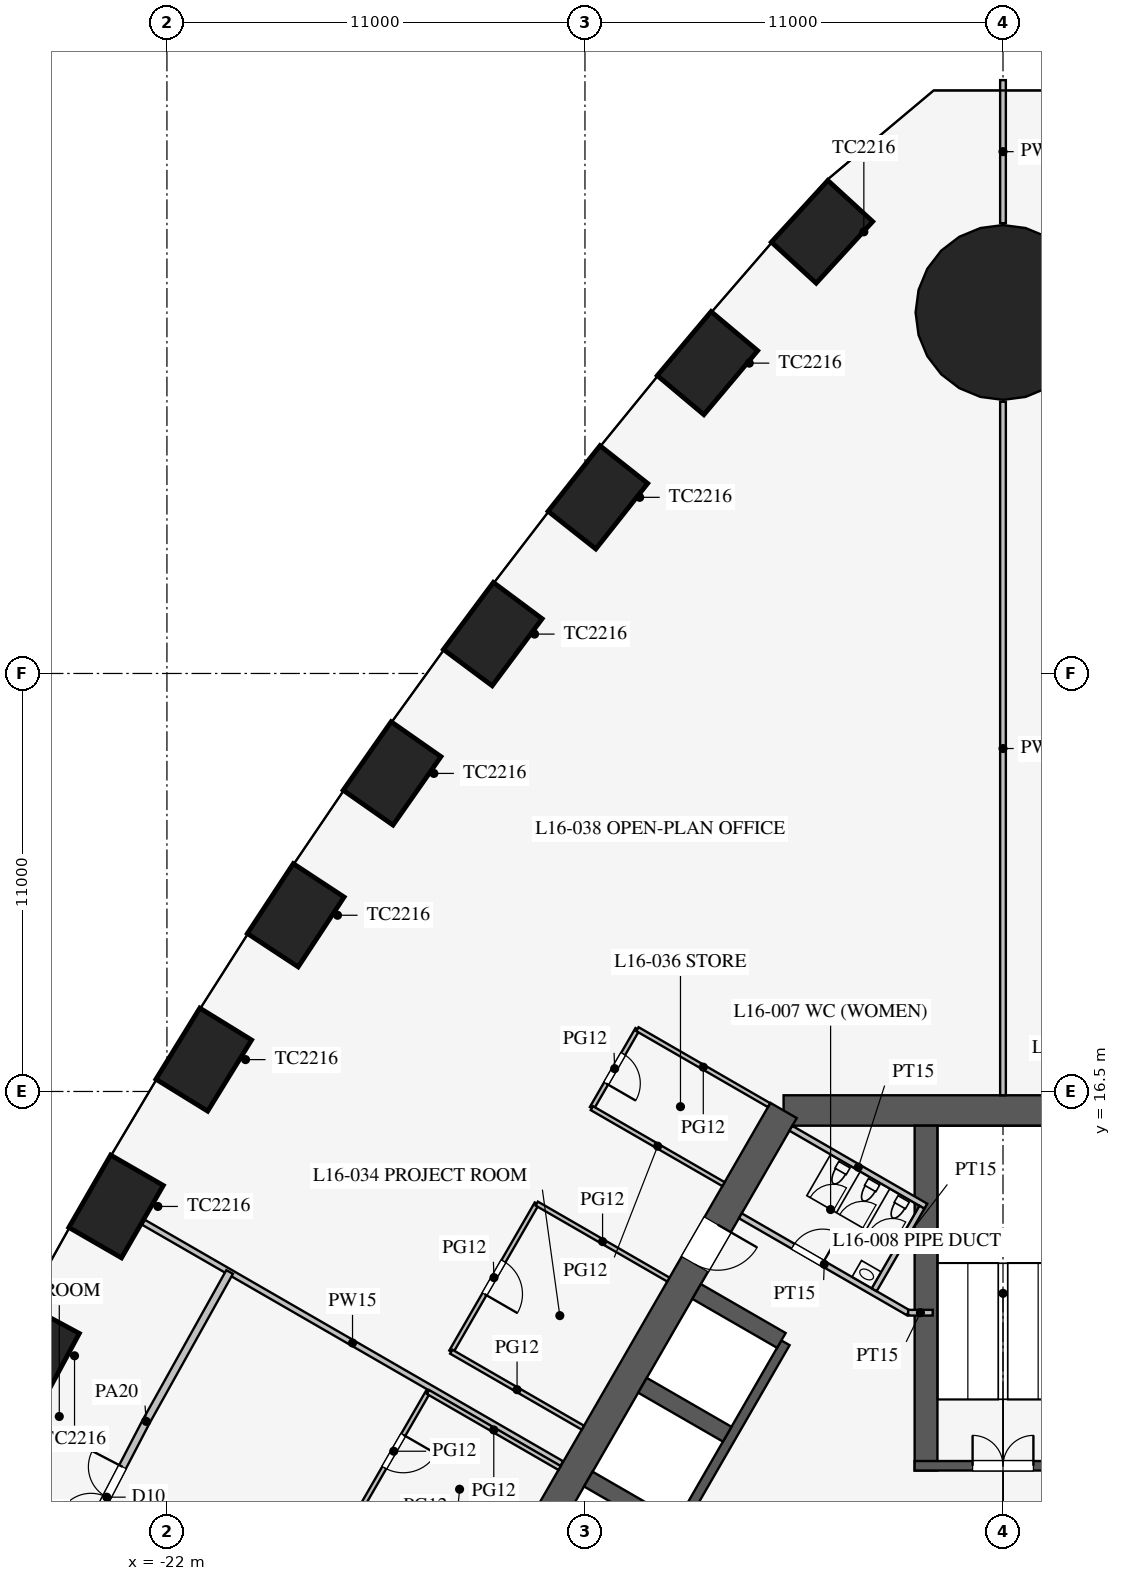
"""IFC4 building model, lengths in metres.
Left out: names, types, materials, properties, quantities, classifications, styles, units other than length and angle.
Written with IfcOpenShell. Run it as: python <this file> out.ifc"""

import sys

from ifc_helpers import new_model, si_unit, direction, frame, frame_2d, origin, origin_2d, place, context, subcontext, project, spatial, rectangle, circle, extrude, element, fill, save


model = new_model("IFC4")
c1 = context("Model", 3, precision=1e-05, world=origin(), true_north=direction((0.0, 1.0)))
c2 = subcontext(c1, "Body", "Model", "MODEL_VIEW")
j1 = project(units=[si_unit("LENGTHUNIT", "METRE"), si_unit("PLANEANGLEUNIT", "RADIAN")], contexts=[c1])
p1 = place(None, origin())
s1 = spatial("IfcSite", under=j1, at=p1, CompositionType="ELEMENT")
p2 = place(p1, origin())
s2 = spatial("IfcBuilding", under=s1, at=p2, CompositionType="ELEMENT")
p3 = place(p2, frame((0.0, 0.0, 71.1)))
s3 = spatial("IfcBuildingStorey", under=s2, at=p3, CompositionType="ELEMENT", Elevation=71.1)
for number, where, z_axis, x_axis in (
    (1, (-4.762, 39.122, 0.0), (0.0, 0.0, 1.0), (-0.676, -0.737, 0.0)),
    (2, (-7.776, 35.667, 0.0), (0.0, 0.0, 1.0), (-0.643, -0.766, 0.0)),
    (3, (-10.66, 32.135, 0.0), (0.0, 0.0, 1.0), (-0.62, -0.784, 0.0)),
    (4, (-13.426, 28.536, 0.0), (0.0, 0.0, 1.0), (-0.597, -0.802, 0.0)),
    (5, (-16.076, 24.87, 0.0), (0.0, 0.0, 1.0), (-0.574, -0.819, 0.0)),
    (6, (-18.611, 21.137, 0.0), (0.0, 0.0, 1.0), (-0.549, -0.836, 0.0)),
    (7, (-21.031, 17.339, 0.0), (0.0, 0.0, 1.0), (-0.525, -0.851, 0.0)),
    (8, (-23.338, 13.474, 0.0), (0.0, 0.0, 1.0), (-0.5, -0.866, 0.0)),
    (9, (-25.531, 9.544, 0.0), (0.0, 0.0, 1.0), (-0.475, -0.88, 0.0)),
):
    element("IfcColumn", number, at=place(p3, frame(where, z_axis=z_axis, x_axis=x_axis)), inside=s3, PredefinedType="COLUMN", context=c2, shape_type="SweptSolid", body=[
        extrude(rectangle(XDim=2.2, YDim=1.6, at=origin_2d()), origin(), (0.0, 0.0, 1.0), 4.2),
    ])
p4 = place(p3, frame((0.0, 37.0, 0.0), z_axis=(0.0, 0.0, 1.0), x_axis=(1.0, 0.0, 0.0)))
e10 = element("IfcColumn", 10, at=p4, inside=s3, PredefinedType="COLUMN", context=c2, shape_type="SweptSolid", body=[
    extrude(circle(Radius=2.3, at=origin_2d()), origin(), (0.0, 0.0, 1.0), 4.2),
])
p5 = place(p3, frame((5.773, 16.0, 0.0), z_axis=(0.0, 0.0, 1.0), x_axis=(-1.0, 0.0, 0.0)))
e11 = element("IfcWall", 11, at=p5, inside=s3, PredefinedType="SHEAR", context=c2, shape_type="SweptSolid", body=[
    extrude(rectangle(XDim=11.547, YDim=0.8, at=frame_2d((5.773, 0.0))), origin(), (0.0, 0.0, 1.0), 4.2),
])
p6 = place(p3, frame((-5.773, 16.0, 0.0), z_axis=(0.0, 0.0, 1.0), x_axis=(-0.500002442456, -0.866023993627, 0.0)))
e12 = element("IfcWall", 12, at=p6, inside=s3, PredefinedType="SHEAR", context=c2, shape_type="SweptSolid", body=[
    extrude(rectangle(XDim=21.939, YDim=0.8, at=frame_2d((10.97, 0.0))), origin(), (0.0, 0.0, 1.0), 4.2),
])
p7 = place(p6, frame((17.27, 0.0, 0.0)))
e13 = element("IfcOpeningElement", 13, at=p7, cuts=e12, PredefinedType="OPENING", context=c2, shape_type="SweptSolid", body=[
    extrude(rectangle(XDim=1.2, YDim=2.1, at=frame_2d((0.6, 1.05))), frame((0.0, 0.41, 0.0), z_axis=(0.0, -1.0, 0.0), x_axis=(1.0, 0.0, 0.0)), (0.0, 0.0, 1.0), 0.82),
])
p8 = place(p6, frame((3.47, 0.0, 0.0)))
e14 = element("IfcOpeningElement", 14, at=p8, cuts=e12, PredefinedType="OPENING", context=c2, shape_type="SweptSolid", body=[
    extrude(rectangle(XDim=1.2, YDim=2.1, at=frame_2d((0.6, 1.05))), frame((0.0, 0.41, 0.0), z_axis=(0.0, -1.0, 0.0), x_axis=(1.0, 0.0, 0.0)), (0.0, 0.0, 1.0), 0.82),
])
p9 = place(p3, frame((-5.724, 9.886, 0.0), z_axis=(0.0, 0.0, 1.0), x_axis=(-0.500001763848, -0.866024385424, 0.0)))
e15 = element("IfcWall", 15, at=p9, inside=s3, PredefinedType="SHEAR", context=c2, shape_type="SweptSolid", body=[
    extrude(rectangle(XDim=11.4, YDim=0.25, at=frame_2d((5.7, 0.0))), origin(), (0.0, 0.0, 1.0), 4.2),
])
p10 = place(p9, frame((6.525, 0.0, 0.0)))
e16 = element("IfcOpeningElement", 16, at=p10, cuts=e15, PredefinedType="OPENING", context=c2, shape_type="SweptSolid", body=[
    extrude(rectangle(XDim=1.2, YDim=2.2, at=frame_2d((0.6, 1.1))), frame((0.0, 0.135, 0.0), z_axis=(0.0, -1.0, 0.0), x_axis=(1.0, 0.0, 0.0)), (0.0, 0.0, 1.0), 0.27),
])
p11 = place(p9, frame((9.375, 0.0, 0.0)))
e17 = element("IfcOpeningElement", 17, at=p11, cuts=e15, PredefinedType="OPENING", context=c2, shape_type="SweptSolid", body=[
    extrude(rectangle(XDim=1.2, YDim=2.2, at=frame_2d((0.6, 1.1))), frame((0.0, 0.135, 0.0), z_axis=(0.0, -1.0, 0.0), x_axis=(1.0, 0.0, 0.0)), (0.0, 0.0, 1.0), 0.27),
])
p12 = place(p3, frame((-5.832, 9.949, 0.0), z_axis=(0.0, 0.0, 1.0), x_axis=(-0.866029291668, 0.499993265928, 0.0)))
e18 = element("IfcWall", 18, at=p12, inside=s3, PredefinedType="SHEAR", context=c2, shape_type="SweptSolid", body=[
    extrude(rectangle(XDim=2.575, YDim=0.45, at=frame_2d((1.288, 0.0))), origin(), (0.0, 0.0, 1.0), 4.2),
])
for number, where, z_axis, x_axis in (
    (19, (-7.257, 7.481, 0.0), (0.0, 0.0, 1.0), (-0.866, 0.5, 0.0)),
    (20, (-8.682, 5.012, 0.0), (0.0, 0.0, 1.0), (-0.866, 0.5, 0.0)),
):
    element("IfcWall", number, at=place(p3, frame(where, z_axis=z_axis, x_axis=x_axis)), inside=s3, PredefinedType="SHEAR", context=c2, shape_type="SweptSolid", body=[
        extrude(rectangle(XDim=2.575, YDim=0.45, at=frame_2d((1.288, 0.0))), origin(), (0.0, 0.0, 1.0), 4.2),
    ])
p13 = place(p3, frame((-2.025, 6.525, 0.0), z_axis=(0.0, 0.0, 1.0), x_axis=(0.0, 1.0, 0.0)))
e21 = element("IfcWall", 21, at=p13, inside=s3, PredefinedType="SHEAR", context=c2, shape_type="SweptSolid", body=[
    extrude(rectangle(XDim=9.075, YDim=0.6, at=frame_2d((4.538, 0.0))), origin(), (0.0, 0.0, 1.0), 4.2),
])
p14 = place(p3, frame((2.325, 6.65, 0.0), z_axis=(0.0, 0.0, 1.0), x_axis=(-1.0, 0.0, 0.0)))
e22 = element("IfcWall", 22, at=p14, inside=s3, PredefinedType="SHEAR", context=c2, shape_type="SweptSolid", body=[
    extrude(rectangle(XDim=4.65, YDim=0.25, at=frame_2d((2.325, 0.0))), origin(), (0.0, 0.0, 1.0), 4.2),
])
p15 = place(p14, frame((1.525, 0.0, 0.0)))
e23 = element("IfcOpeningElement", 23, at=p15, cuts=e22, PredefinedType="OPENING", context=c2, shape_type="SweptSolid", body=[
    extrude(rectangle(XDim=1.6, YDim=2.1, at=frame_2d((0.8, 1.05))), frame((0.0, 0.135, 0.0), z_axis=(0.0, -1.0, 0.0), x_axis=(1.0, 0.0, 0.0)), (0.0, 0.0, 1.0), 0.27),
])
p16 = place(p3, frame((-2.495, 10.678, 0.0), z_axis=(0.0, 0.0, 1.0), x_axis=(-0.86602216432, 0.500005610874, 0.0)))
e24 = element("IfcWall", 24, at=p16, inside=s3, PredefinedType="PARTITIONING", context=c2, shape_type="SweptSolid", body=[
    extrude(rectangle(XDim=5.1, YDim=0.15, at=frame_2d((2.55, 0.0))), origin(), (0.0, 0.0, 1.0), 4.0),
])
p17 = place(p16, frame((2.6, 0.0, 0.0)))
e25 = element("IfcOpeningElement", 25, at=p17, cuts=e24, PredefinedType="OPENING", context=c2, shape_type="SweptSolid", body=[
    extrude(rectangle(XDim=0.9, YDim=2.1, at=frame_2d((0.45, 1.05))), frame((0.0, 0.085, 0.0), z_axis=(0.0, -1.0, 0.0), x_axis=(1.0, 0.0, 0.0)), (0.0, 0.0, 1.0), 0.17),
])
p18 = place(p3, frame((-2.495, 10.678, 0.0), z_axis=(0.0, 0.0, 1.0), x_axis=(1.0, 0.0, 0.0)))
e26 = element("IfcWall", 26, at=p18, inside=s3, PredefinedType="PARTITIONING", context=c2, shape_type="SweptSolid", body=[
    extrude(rectangle(XDim=0.645, YDim=0.15, at=frame_2d((0.323, 0.0))), origin(), (0.0, 0.0, 1.0), 4.0),
])
p19 = place(p3, frame((-2.031, 13.482, 0.0), z_axis=(0.0, 0.0, 1.0), x_axis=(-0.866050731258, 0.499956128963, 0.0)))
e27 = element("IfcWall", 27, at=p19, inside=s3, PredefinedType="PARTITIONING", context=c2, shape_type="SweptSolid", body=[
    extrude(rectangle(XDim=4.1, YDim=0.15, at=frame_2d((2.05, 0.0))), origin(), (0.0, 0.0, 1.0), 4.0),
])
p20 = place(p3, frame((-3.389, 11.281, 0.0), z_axis=(0.0, 0.0, 1.0), x_axis=(0.499989096993, 0.866031698547, 0.0)))
e28 = element("IfcWall", 28, at=p20, inside=s3, PredefinedType="PARTITIONING", context=c2, shape_type="SweptSolid", body=[
    extrude(rectangle(XDim=2.51, YDim=0.15, at=frame_2d((1.255, 0.0))), origin(), (0.0, 0.0, 1.0), 4.0),
])
p21 = place(p3, frame((0.0, 16.4, 0.0), z_axis=(0.0, 0.0, 1.0), x_axis=(0.0, 1.0, 0.0)))
e29 = element("IfcWall", 29, at=p21, inside=s3, PredefinedType="PARTITIONING", context=c2, shape_type="SweptSolid", body=[
    extrude(rectangle(XDim=18.25, YDim=0.15, at=frame_2d((9.125, 0.0))), origin(), (0.0, 0.0, 1.0), 2.3),
])
p22 = place(p3, frame((0.0, 39.35, 0.0), z_axis=(0.0, 0.0, 1.0), x_axis=(0.0, 1.0, 0.0)))
e30 = element("IfcWall", 30, at=p22, inside=s3, PredefinedType="PARTITIONING", context=c2, shape_type="SweptSolid", body=[
    extrude(rectangle(XDim=3.764, YDim=0.15, at=frame_2d((1.882, 0.0))), origin(), (0.0, 0.0, 1.0), 2.3),
])
p23 = place(p3, frame((-11.613, 6.705, 0.0), z_axis=(0.0, 0.0, 1.0), x_axis=(-0.866029791586, 0.499992400027, 0.0)))
e31 = element("IfcWall", 31, at=p23, inside=s3, PredefinedType="PARTITIONING", context=c2, shape_type="SweptSolid", body=[
    extrude(rectangle(XDim=12.709, YDim=0.15, at=frame_2d((6.354, 0.0))), origin(), (0.0, 0.0, 1.0), 2.8),
])
p24 = place(p3, frame((-15.131, 8.592, 0.0), z_axis=(0.0, 0.0, 1.0), x_axis=(-0.500012057535, -0.866018442252, 0.0)))
e32 = element("IfcWall", 32, at=p24, inside=s3, PredefinedType="PARTITIONING", context=c2, shape_type="SweptSolid", body=[
    extrude(rectangle(XDim=3.6, YDim=0.12, at=frame_2d((1.8, 0.0))), origin(), (0.0, 0.0, 1.0), 2.9),
])
p25 = place(p24, frame((1.3, 0.0, 0.15)))
e33 = element("IfcOpeningElement", 33, at=p25, cuts=e32, PredefinedType="OPENING", context=c2, shape_type="SweptSolid", body=[
    extrude(rectangle(XDim=1.0, YDim=2.1, at=frame_2d((0.5, 1.05))), frame((0.0, 0.07, 0.0), z_axis=(0.0, -1.0, 0.0), x_axis=(1.0, 0.0, 0.0)), (0.0, 0.0, 1.0), 0.14),
])
p26 = place(p3, frame((-9.619, 18.14, 0.0), z_axis=(0.0, 0.0, 1.0), x_axis=(-0.500001309137, -0.866024647952, 0.0)))
e34 = element("IfcWall", 34, at=p26, inside=s3, PredefinedType="PARTITIONING", context=c2, shape_type="SweptSolid", body=[
    extrude(rectangle(XDim=2.4, YDim=0.12, at=frame_2d((1.2, 0.0))), origin(), (0.0, 0.0, 1.0), 2.9),
])
p27 = place(p26, frame((0.75, 0.0, 0.15)))
e35 = element("IfcOpeningElement", 35, at=p27, cuts=e34, PredefinedType="OPENING", context=c2, shape_type="SweptSolid", body=[
    extrude(rectangle(XDim=0.9, YDim=2.1, at=frame_2d((0.45, 1.05))), frame((0.0, 0.07, 0.0), z_axis=(0.0, -1.0, 0.0), x_axis=(1.0, 0.0, 0.0)), (0.0, 0.0, 1.0), 0.14),
])
p28 = place(p3, frame((-12.269, 13.55, 0.0), z_axis=(0.0, 0.0, 1.0), x_axis=(-0.499990139034, -0.866031096941, 0.0)))
e36 = element("IfcWall", 36, at=p28, inside=s3, PredefinedType="PARTITIONING", context=c2, shape_type="SweptSolid", body=[
    extrude(rectangle(XDim=4.5, YDim=0.12, at=frame_2d((2.25, 0.0))), origin(), (0.0, 0.0, 1.0), 2.9),
])
p29 = place(p28, frame((1.75, 0.0, 0.15)))
e37 = element("IfcOpeningElement", 37, at=p29, cuts=e36, PredefinedType="OPENING", context=c2, shape_type="SweptSolid", body=[
    extrude(rectangle(XDim=1.0, YDim=2.1, at=frame_2d((0.5, 1.05))), frame((0.0, 0.07, 0.0), z_axis=(0.0, -1.0, 0.0), x_axis=(1.0, 0.0, 0.0)), (0.0, 0.0, 1.0), 0.14),
])
p30 = place(p3, frame((-11.667, 6.592, 0.0), z_axis=(0.0, 0.0, 1.0), x_axis=(-0.866026010844, 0.49999894854, 0.0)))
e38 = element("IfcWall", 38, at=p30, inside=s3, PredefinedType="PARTITIONING", context=c2, shape_type="SweptSolid", body=[
    extrude(rectangle(XDim=4.0, YDim=0.12, at=frame_2d((2.0, 0.0))), origin(), (0.0, 0.0, 1.0), 2.8),
])
for number, where, z_axis, x_axis in (
    (39, (-11.055, 7.653, 0.0), (0.0, 0.0, 1.0), (-0.866, 0.5, 0.0)),
    (40, (-6.155, 16.14, 0.0), (0.0, 0.0, 1.0), (-0.866, 0.5, 0.0)),
    (41, (-8.805, 11.55, 0.0), (0.0, 0.0, 1.0), (-0.866, 0.5, 0.0)),
    (42, (-7.355, 14.061, 0.0), (0.0, 0.0, 1.0), (-0.866, 0.5, 0.0)),
):
    element("IfcWall", number, at=place(p3, frame(where, z_axis=z_axis, x_axis=x_axis)), inside=s3, PredefinedType="PARTITIONING", context=c2, shape_type="SweptSolid", body=[
        extrude(rectangle(XDim=4.0, YDim=0.12, at=frame_2d((2.0, 0.0))), origin(), (0.0, 0.0, 1.0), 2.9),
    ])
p31 = place(p3, frame((-20.351, 11.749, 0.0), z_axis=(0.0, 0.0, 1.0), x_axis=(-0.487373854787, -0.873193406795, 0.0)))
e43 = element("IfcWall", 43, at=p31, inside=s3, PredefinedType="PARTITIONING", context=c2, shape_type="SweptSolid", body=[
    extrude(rectangle(XDim=4.5, YDim=0.2, at=frame_2d((2.25, 0.0))), origin(), (0.0, 0.0, 1.0), 2.9),
])
p32 = place(p3, frame((-22.544, 7.82, 0.0), z_axis=(0.0, 0.0, 1.0), x_axis=(-0.461810056307, -0.886978845235, 0.0)))
e44 = element("IfcWall", 44, at=p32, inside=s3, PredefinedType="PARTITIONING", context=c2, shape_type="SweptSolid", body=[
    extrude(rectangle(XDim=4.504, YDim=0.2, at=frame_2d((2.252, 0.0))), origin(), (0.0, 0.0, 1.0), 2.9),
])
p33 = place(p32, frame((1.35, 0.0, 0.15)))
e45 = element("IfcOpeningElement", 45, at=p33, cuts=e44, PredefinedType="OPENING", context=c2, shape_type="SweptSolid", body=[
    extrude(rectangle(XDim=1.8, YDim=2.1, at=frame_2d((0.9, 1.05))), frame((0.0, 0.11, 0.0), z_axis=(0.0, -1.0, 0.0), x_axis=(1.0, 0.0, 0.0)), (0.0, 0.0, 1.0), 0.22),
])
p34 = place(p17, frame((0.9, 0.0, 0.0), z_axis=(0.0, 0.0, 1.0), x_axis=(-1.0, 0.0, 0.0)))
e46 = element("IfcDoor", 46, at=p34, inside=s3, OperationType="SINGLE_SWING_RIGHT", PredefinedType="DOOR", context=c2, shape_type="SweptSolid", body=[
    extrude(rectangle(XDim=0.9, YDim=2.1, at=frame_2d((0.45, 1.05))), frame((0.0, 0.025, 0.0), z_axis=(0.0, -1.0, 0.0), x_axis=(1.0, 0.0, 0.0)), (0.0, 0.0, 1.0), 0.05),
])
fill(e25, e46)
p35 = place(p15, frame((1.6, 0.0, 0.0), z_axis=(0.0, 0.0, 1.0), x_axis=(-1.0, 0.0, 0.0)))
e47 = element("IfcDoor", 47, at=p35, inside=s3, OperationType="DOUBLE_DOOR_SINGLE_SWING", PredefinedType="DOOR", context=c2, shape_type="SweptSolid", body=[
    extrude(rectangle(XDim=1.6, YDim=2.1, at=frame_2d((0.8, 1.05))), frame((0.0, 0.025, 0.0), z_axis=(0.0, -1.0, 0.0), x_axis=(1.0, 0.0, 0.0)), (0.0, 0.0, 1.0), 0.05),
])
fill(e23, e47)
p36 = place(p8, origin())
e48 = element("IfcDoor", 48, at=p36, inside=s3, OperationType="SINGLE_SWING_LEFT", PredefinedType="DOOR", context=c2, shape_type="SweptSolid", body=[
    extrude(rectangle(XDim=1.2, YDim=2.1, at=frame_2d((0.6, 1.05))), frame((0.0, 0.025, 0.0), z_axis=(0.0, -1.0, 0.0), x_axis=(1.0, 0.0, 0.0)), (0.0, 0.0, 1.0), 0.05),
])
fill(e14, e48)
p37 = place(p29, origin())
e49 = element("IfcDoor", 49, at=p37, inside=s3, OperationType="SINGLE_SWING_RIGHT", PredefinedType="DOOR", context=c2, shape_type="SweptSolid", body=[
    extrude(rectangle(XDim=1.0, YDim=2.1, at=frame_2d((0.5, 1.05))), frame((0.0, 0.025, 0.0), z_axis=(0.0, -1.0, 0.0), x_axis=(1.0, 0.0, 0.0)), (0.0, 0.0, 1.0), 0.05),
])
fill(e37, e49)
p38 = place(p25, origin())
e50 = element("IfcDoor", 50, at=p38, inside=s3, OperationType="SINGLE_SWING_LEFT", PredefinedType="DOOR", context=c2, shape_type="SweptSolid", body=[
    extrude(rectangle(XDim=1.0, YDim=2.1, at=frame_2d((0.5, 1.05))), frame((0.0, 0.025, 0.0), z_axis=(0.0, -1.0, 0.0), x_axis=(1.0, 0.0, 0.0)), (0.0, 0.0, 1.0), 0.05),
])
fill(e33, e50)
p39 = place(p27, origin())
e51 = element("IfcDoor", 51, at=p39, inside=s3, OperationType="SINGLE_SWING_RIGHT", PredefinedType="DOOR", context=c2, shape_type="SweptSolid", body=[
    extrude(rectangle(XDim=0.9, YDim=2.1, at=frame_2d((0.45, 1.05))), frame((0.0, 0.025, 0.0), z_axis=(0.0, -1.0, 0.0), x_axis=(1.0, 0.0, 0.0)), (0.0, 0.0, 1.0), 0.05),
])
fill(e35, e51)
p40 = place(p33, frame((1.8, 0.0, 0.0), z_axis=(0.0, 0.0, 1.0), x_axis=(-1.0, 0.0, 0.0)))
e52 = element("IfcDoor", 52, at=p40, inside=s3, OperationType="DOUBLE_DOOR_SINGLE_SWING", PredefinedType="DOOR", context=c2, shape_type="SweptSolid", body=[
    extrude(rectangle(XDim=1.8, YDim=2.1, at=frame_2d((0.9, 1.05))), frame((0.0, 0.025, 0.0), z_axis=(0.0, -1.0, 0.0), x_axis=(1.0, 0.0, 0.0)), (0.0, 0.0, 1.0), 0.05),
])
fill(e45, e52)
save(model, sys.argv[1])
